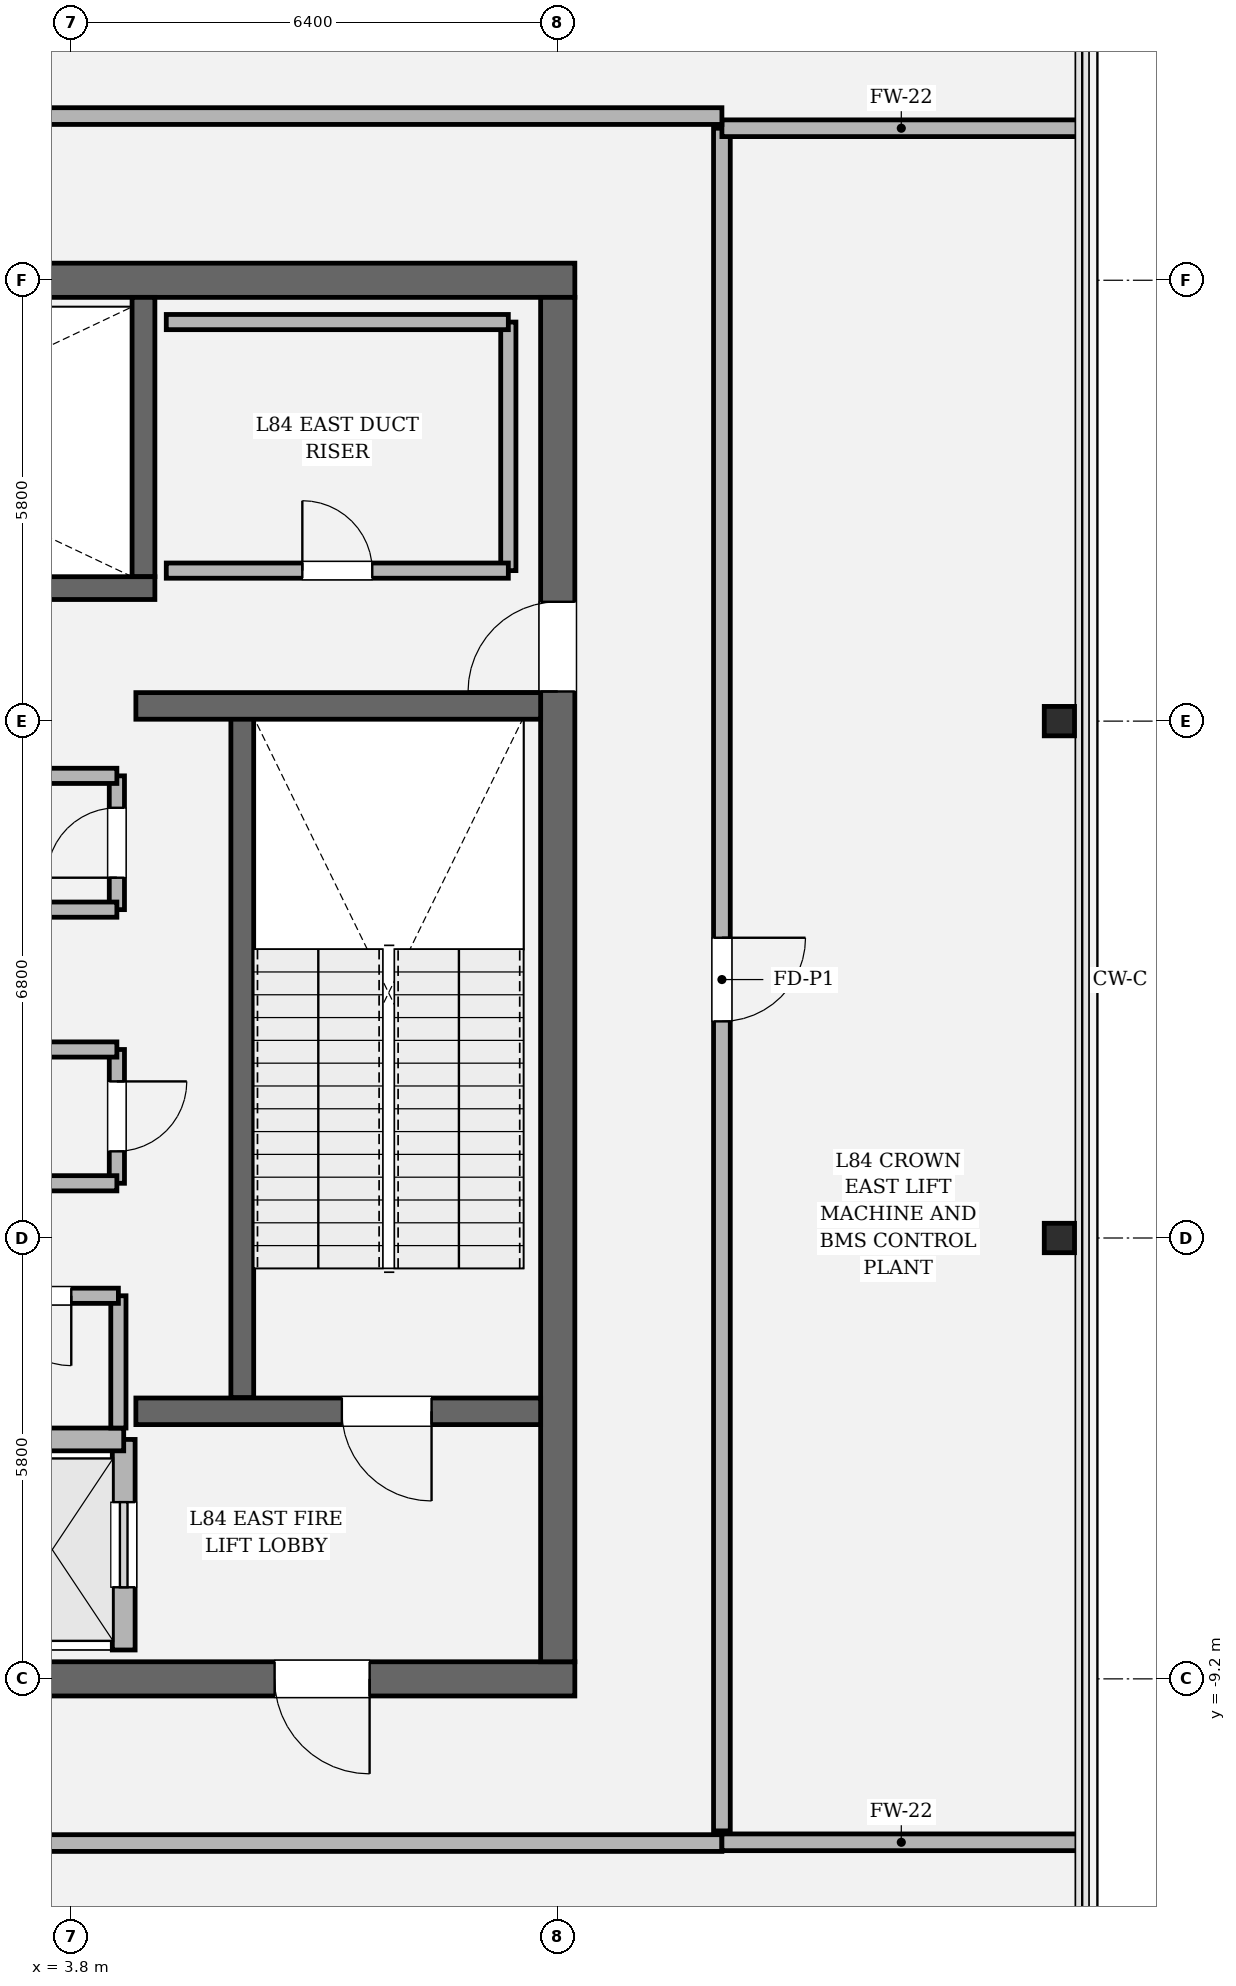
"""IFC4 building model, lengths in metres.
Left out: names, types, materials, properties, quantities, classifications, styles, units other than length and angle.
Written with IfcOpenShell. Run it as: python <this file> out.ifc"""

import sys

from ifc_helpers import new_model, si_unit, direction, frame, frame_2d, origin, origin_2d, place, context, subcontext, project, spatial, rectangle, i_section, extrude, element, fill, save


model = new_model("IFC4")
c1 = context("Model", 3, precision=1e-05, world=origin(), true_north=direction((0.0, 1.0)))
c2 = subcontext(c1, "Body", "Model", "MODEL_VIEW")
j1 = project(units=[si_unit("LENGTHUNIT", "METRE"), si_unit("PLANEANGLEUNIT", "RADIAN")], contexts=[c1])
p1 = place(None, origin())
s1 = spatial("IfcSite", under=j1, at=p1, CompositionType="ELEMENT")
p2 = place(p1, origin())
s2 = spatial("IfcBuilding", under=s1, at=p2, CompositionType="ELEMENT")
p3 = place(p2, frame((0.0, 0.0, 357.3)))
s3 = spatial("IfcBuildingStorey", under=s2, at=p3, CompositionType="ELEMENT", Elevation=357.3)
p4 = place(p3, frame((10.425, -9.2, 0.0), z_axis=(0.0, 0.0, 1.0), x_axis=(-1.0, 0.0, 0.0)))
e1 = element("IfcWall", 1, at=p4, inside=s3, PredefinedType="SHEAR", context=c2, shape_type="SweptSolid", body=[
    extrude(rectangle(XDim=20.85, YDim=0.45, at=frame_2d((10.425, 0.0))), origin(), (0.0, 0.0, 1.0), 4.5),
])
p5 = place(p4, frame((2.7, 0.0, 0.0)))
e2 = element("IfcOpeningElement", 2, at=p5, cuts=e1, PredefinedType="OPENING", context=c2, shape_type="SweptSolid", body=[
    extrude(rectangle(XDim=1.25, YDim=2.25, at=frame_2d((0.625, 1.125))), frame((0.0, 0.235, 0.0), z_axis=(0.0, -1.0, 0.0), x_axis=(1.0, 0.0, 0.0)), (0.0, 0.0, 1.0), 0.47),
])
p6 = place(p4, frame((16.9, 0.0, 0.0)))
e3 = element("IfcOpeningElement", 3, at=p6, cuts=e1, PredefinedType="OPENING", context=c2, shape_type="SweptSolid", body=[
    extrude(rectangle(XDim=1.25, YDim=2.25, at=frame_2d((0.625, 1.125))), frame((0.0, 0.235, 0.0), z_axis=(0.0, -1.0, 0.0), x_axis=(1.0, 0.0, 0.0)), (0.0, 0.0, 1.0), 0.47),
])
p7 = place(p3, frame((-10.425, 9.2, 0.0), z_axis=(0.0, 0.0, 1.0), x_axis=(1.0, 0.0, 0.0)))
e4 = element("IfcWall", 4, at=p7, inside=s3, PredefinedType="SHEAR", context=c2, shape_type="SweptSolid", body=[
    extrude(rectangle(XDim=20.85, YDim=0.45, at=frame_2d((10.425, 0.0))), origin(), (0.0, 0.0, 1.0), 4.5),
])
p8 = place(p3, frame((10.2, 8.975, 0.0), z_axis=(0.0, 0.0, 1.0), x_axis=(0.0, -1.0, 0.0)))
e5 = element("IfcWall", 5, at=p8, inside=s3, PredefinedType="SHEAR", context=c2, shape_type="SweptSolid", body=[
    extrude(rectangle(XDim=17.95, YDim=0.45, at=frame_2d((8.975, 0.0))), origin(), (0.0, 0.0, 1.0), 4.5),
])
p9 = place(p8, frame((4.005, 0.0, 0.0)))
e6 = element("IfcOpeningElement", 6, at=p9, cuts=e5, PredefinedType="OPENING", context=c2, shape_type="SweptSolid", body=[
    extrude(rectangle(XDim=1.18, YDim=2.2, at=frame_2d((0.59, 1.1))), frame((0.0, 0.235, 0.0), z_axis=(0.0, -1.0, 0.0), x_axis=(1.0, 0.0, 0.0)), (0.0, 0.0, 1.0), 0.47),
])
p10 = place(p3, frame((6.05, 3.45, 0.0), z_axis=(0.0, 0.0, 1.0), x_axis=(0.0, -1.0, 0.0)))
e7 = element("IfcWall", 7, at=p10, inside=s3, PredefinedType="SOLIDWALL", context=c2, shape_type="SweptSolid", body=[
    extrude(rectangle(XDim=8.95, YDim=0.3, at=frame_2d((4.475, 0.0))), origin(), (0.0, 0.0, 1.0), 4.5),
])
p11 = place(p3, frame((4.75, 8.975, 0.0), z_axis=(0.0, 0.0, 1.0), x_axis=(0.0, -1.0, 0.0)))
e8 = element("IfcWall", 8, at=p11, inside=s3, PredefinedType="SOLIDWALL", context=c2, shape_type="SweptSolid", body=[
    extrude(rectangle(XDim=3.675, YDim=0.3, at=frame_2d((1.837, 0.0))), origin(), (0.0, 0.0, 1.0), 4.5),
])
p12 = place(p3, frame((-4.9, 5.15, 0.0), z_axis=(0.0, 0.0, 1.0), x_axis=(1.0, 0.0, 0.0)))
e9 = element("IfcWall", 9, at=p12, inside=s3, PredefinedType="SOLIDWALL", context=c2, shape_type="SweptSolid", body=[
    extrude(rectangle(XDim=9.8, YDim=0.3, at=frame_2d((4.9, 0.0))), origin(), (0.0, 0.0, 1.0), 4.5),
])
p13 = place(p12, frame((0.56, 0.0, 0.0)))
e10 = element("IfcOpeningElement", 10, at=p13, cuts=e9, PredefinedType="OPENING", context=c2, shape_type="SweptSolid", body=[
    extrude(rectangle(XDim=1.18, YDim=2.2, at=frame_2d((0.59, 1.1))), frame((0.0, 0.16, 0.0), z_axis=(0.0, -1.0, 0.0), x_axis=(1.0, 0.0, 0.0)), (0.0, 0.0, 1.0), 0.32),
])
p14 = place(p3, frame((4.65, -5.68, 0.0), z_axis=(0.0, 0.0, 1.0), x_axis=(1.0, 0.0, 0.0)))
e11 = element("IfcWall", 11, at=p14, inside=s3, PredefinedType="SOLIDWALL", context=c2, shape_type="SweptSolid", body=[
    extrude(rectangle(XDim=5.325, YDim=0.35, at=frame_2d((2.663, 0.0))), origin(), (0.0, 0.0, 1.0), 4.5),
])
p15 = place(p14, frame((2.71, 0.0, 0.0)))
e12 = element("IfcOpeningElement", 12, at=p15, cuts=e11, PredefinedType="OPENING", context=c2, shape_type="SweptSolid", body=[
    extrude(rectangle(XDim=1.18, YDim=2.2, at=frame_2d((0.59, 1.1))), frame((0.0, 0.185, 0.0), z_axis=(0.0, -1.0, 0.0), x_axis=(1.0, 0.0, 0.0)), (0.0, 0.0, 1.0), 0.37),
])
p16 = place(p3, frame((4.65, 3.6, 0.0), z_axis=(0.0, 0.0, 1.0), x_axis=(1.0, 0.0, 0.0)))
e13 = element("IfcWall", 13, at=p16, inside=s3, PredefinedType="SOLIDWALL", context=c2, shape_type="SweptSolid", body=[
    extrude(rectangle(XDim=5.325, YDim=0.35, at=frame_2d((2.663, 0.0))), origin(), (0.0, 0.0, 1.0), 4.5),
])
for number, where, z_axis, x_axis in (
    (14, (16.8, -3.4, 0.0), (0.0, 0.0, 1.0), (1.0, 0.0, 0.0)),
    (15, (16.8, 3.4, 0.0), (0.0, 0.0, 1.0), (1.0, 0.0, 0.0)),
):
    element("IfcColumn", number, at=place(p3, frame(where, z_axis=z_axis, x_axis=x_axis)), inside=s3, PredefinedType="COLUMN", context=c2, shape_type="SweptSolid", body=[
        extrude(i_section(OverallWidth=0.398, OverallDepth=0.387, WebThickness=0.021, FlangeThickness=0.033, FilletRadius=0.018, at=origin_2d()), origin(), (0.0, 0.0, 1.0), 4.498),
    ])
p17 = place(p3, frame((4.49, -8.82, 0.0), z_axis=(0.0, 0.0, 1.0), x_axis=(0.0, 1.0, 0.0)))
e16 = element("IfcWall", 16, at=p17, inside=s3, PredefinedType="SOLIDWALL", context=c2, shape_type="SweptSolid", body=[
    extrude(rectangle(XDim=2.77, YDim=0.3, at=frame_2d((1.385, 0.0))), origin(), (0.0, 0.0, 1.0), 4.22),
])
p18 = place(p17, frame((0.825, 0.0, 0.0)))
e17 = element("IfcOpeningElement", 17, at=p18, cuts=e16, PredefinedType="OPENING", context=c2, shape_type="SweptSolid", body=[
    extrude(rectangle(XDim=1.12, YDim=2.25, at=frame_2d((0.56, 1.125))), frame((0.0, 0.16, 0.0), z_axis=(0.0, -1.0, 0.0), x_axis=(1.0, 0.0, 0.0)), (0.0, 0.0, 1.0), 0.32),
])
p19 = place(p3, frame((2.61, -6.05, 0.0), z_axis=(0.0, 0.0, 1.0), x_axis=(1.0, 0.0, 0.0)))
e18 = element("IfcWall", 18, at=p19, inside=s3, PredefinedType="SOLIDWALL", context=c2, shape_type="SweptSolid", body=[
    extrude(rectangle(XDim=1.88, YDim=0.3, at=frame_2d((0.94, 0.0))), origin(), (0.0, 0.0, 1.0), 4.22),
])
p20 = place(p3, frame((4.42, -5.9, 0.0), z_axis=(0.0, 0.0, 1.0), x_axis=(0.0, 1.0, 0.0)))
e19 = element("IfcWall", 19, at=p20, inside=s3, PredefinedType="SOLIDWALL", context=c2, shape_type="SweptSolid", body=[
    extrude(rectangle(XDim=1.74, YDim=0.2, at=frame_2d((0.87, 0.0))), origin(), (0.0, 0.0, 1.0), 4.22),
])
p21 = place(p3, frame((4.42, -4.16, 0.0), z_axis=(0.0, 0.0, 1.0), x_axis=(-1.0, 0.0, 0.0)))
e20 = element("IfcWall", 20, at=p21, inside=s3, PredefinedType="SOLIDWALL", context=c2, shape_type="SweptSolid", body=[
    extrude(rectangle(XDim=2.16, YDim=0.2, at=frame_2d((1.08, 0.0))), origin(), (0.0, 0.0, 1.0), 4.22),
])
p22 = place(p21, frame((0.62, 0.0, 0.0)))
e21 = element("IfcOpeningElement", 21, at=p22, cuts=e20, PredefinedType="OPENING", context=c2, shape_type="SweptSolid", body=[
    extrude(rectangle(XDim=0.92, YDim=2.1, at=frame_2d((0.46, 1.05))), frame((0.0, 0.11, 0.0), z_axis=(0.0, -1.0, 0.0), x_axis=(1.0, 0.0, 0.0)), (0.0, 0.0, 1.0), 0.22),
])
p23 = place(p3, frame((4.4, -2.68, 0.0), z_axis=(0.0, 0.0, 1.0), x_axis=(0.0, 1.0, 0.0)))
e22 = element("IfcWall", 22, at=p23, inside=s3, PredefinedType="SOLIDWALL", context=c2, shape_type="SweptSolid", body=[
    extrude(rectangle(XDim=1.76, YDim=0.2, at=frame_2d((0.88, 0.0))), origin(), (0.0, 0.0, 1.0), 4.22),
])
p24 = place(p23, frame((0.42, 0.0, 0.0)))
e23 = element("IfcOpeningElement", 23, at=p24, cuts=e22, PredefinedType="OPENING", context=c2, shape_type="SweptSolid", body=[
    extrude(rectangle(XDim=0.92, YDim=2.1, at=frame_2d((0.46, 1.05))), frame((0.0, 0.11, 0.0), z_axis=(0.0, -1.0, 0.0), x_axis=(1.0, 0.0, 0.0)), (0.0, 0.0, 1.0), 0.22),
])
for number, where, z_axis, x_axis in (
    (24, (4.4, -0.92, 0.0), (0.0, 0.0, 1.0), (-1.0, 0.0, 0.0)),
    (25, (-4.4, -2.68, 0.0), (0.0, 0.0, 1.0), (1.0, 0.0, 0.0)),
):
    element("IfcWall", number, at=place(p3, frame(where, z_axis=z_axis, x_axis=x_axis)), inside=s3, PredefinedType="SOLIDWALL", context=c2, shape_type="SweptSolid", body=[
        extrude(rectangle(XDim=8.8, YDim=0.2, at=frame_2d((4.4, 0.0))), origin(), (0.0, 0.0, 1.0), 4.22),
    ])
p25 = place(p3, frame((4.4, 0.92, 0.0), z_axis=(0.0, 0.0, 1.0), x_axis=(0.0, 1.0, 0.0)))
e26 = element("IfcWall", 26, at=p25, inside=s3, PredefinedType="SOLIDWALL", context=c2, shape_type="SweptSolid", body=[
    extrude(rectangle(XDim=1.76, YDim=0.2, at=frame_2d((0.88, 0.0))), origin(), (0.0, 0.0, 1.0), 4.22),
])
p26 = place(p25, frame((0.42, 0.0, 0.0)))
e27 = element("IfcOpeningElement", 27, at=p26, cuts=e26, PredefinedType="OPENING", context=c2, shape_type="SweptSolid", body=[
    extrude(rectangle(XDim=0.92, YDim=2.1, at=frame_2d((0.46, 1.05))), frame((0.0, 0.11, 0.0), z_axis=(0.0, -1.0, 0.0), x_axis=(1.0, 0.0, 0.0)), (0.0, 0.0, 1.0), 0.22),
])
for number, where, z_axis, x_axis in (
    (28, (4.4, 2.68, 0.0), (0.0, 0.0, 1.0), (-1.0, 0.0, 0.0)),
    (29, (-4.4, 0.92, 0.0), (0.0, 0.0, 1.0), (1.0, 0.0, 0.0)),
):
    element("IfcWall", number, at=place(p3, frame(where, z_axis=z_axis, x_axis=x_axis)), inside=s3, PredefinedType="SOLIDWALL", context=c2, shape_type="SweptSolid", body=[
        extrude(rectangle(XDim=8.8, YDim=0.2, at=frame_2d((4.4, 0.0))), origin(), (0.0, 0.0, 1.0), 4.22),
    ])
p27 = place(p3, frame((9.55, 5.38, 0.0), z_axis=(0.0, 0.0, 1.0), x_axis=(0.0, 1.0, 0.0)))
e30 = element("IfcWall", 30, at=p27, inside=s3, PredefinedType="SOLIDWALL", context=c2, shape_type="SweptSolid", body=[
    extrude(rectangle(XDim=3.27, YDim=0.2, at=frame_2d((1.635, 0.0))), origin(), (0.0, 0.0, 1.0), 4.22),
])
p28 = place(p3, frame((9.55, 8.65, 0.0), z_axis=(0.0, 0.0, 1.0), x_axis=(-1.0, 0.0, 0.0)))
e31 = element("IfcWall", 31, at=p28, inside=s3, PredefinedType="SOLIDWALL", context=c2, shape_type="SweptSolid", body=[
    extrude(rectangle(XDim=4.5, YDim=0.2, at=frame_2d((2.25, 0.0))), origin(), (0.0, 0.0, 1.0), 4.22),
])
p29 = place(p3, frame((5.05, 5.38, 0.0), z_axis=(0.0, 0.0, 1.0), x_axis=(1.0, 0.0, 0.0)))
e32 = element("IfcWall", 32, at=p29, inside=s3, PredefinedType="SOLIDWALL", context=c2, shape_type="SweptSolid", body=[
    extrude(rectangle(XDim=4.5, YDim=0.2, at=frame_2d((2.25, 0.0))), origin(), (0.0, 0.0, 1.0), 4.22),
])
p30 = place(p29, frame((1.79, 0.0, 0.0)))
e33 = element("IfcOpeningElement", 33, at=p30, cuts=e32, PredefinedType="OPENING", context=c2, shape_type="SweptSolid", body=[
    extrude(rectangle(XDim=0.92, YDim=2.1, at=frame_2d((0.46, 1.05))), frame((0.0, 0.11, 0.0), z_axis=(0.0, -1.0, 0.0), x_axis=(1.0, 0.0, 0.0)), (0.0, 0.0, 1.0), 0.22),
])
p31 = place(p3, frame((-12.36, -11.36, 0.0), z_axis=(0.0, 0.0, 1.0), x_axis=(1.0, 0.0, 0.0)))
e34 = element("IfcWall", 34, at=p31, inside=s3, PredefinedType="SOLIDWALL", context=c2, shape_type="SweptSolid", body=[
    extrude(rectangle(XDim=24.72, YDim=0.22, at=frame_2d((12.36, 0.0))), origin(), (0.0, 0.0, 1.0), 2.934),
])
p32 = place(p31, frame((11.81, 0.0, 0.0)))
e35 = element("IfcOpeningElement", 35, at=p32, cuts=e34, PredefinedType="OPENING", context=c2, shape_type="SweptSolid", body=[
    extrude(rectangle(XDim=1.1, YDim=2.2, at=frame_2d((0.55, 1.1))), frame((0.0, 0.12, 0.0), z_axis=(0.0, -1.0, 0.0), x_axis=(1.0, 0.0, 0.0)), (0.0, 0.0, 1.0), 0.24),
])
p33 = place(p3, frame((12.36, -11.35, 0.0), z_axis=(0.0, 0.0, 1.0), x_axis=(1.0, 0.0, 0.0)))
e36 = element("IfcWall", 36, at=p33, inside=s3, PredefinedType="SOLIDWALL", context=c2, shape_type="SweptSolid", body=[
    extrude(rectangle(XDim=4.72, YDim=0.22, at=frame_2d((2.36, 0.0))), origin(), (0.0, 0.0, 1.0), 2.934),
])
p34 = place(p3, frame((12.36, -11.2, 0.0), z_axis=(0.0, 0.0, 1.0), x_axis=(0.0, 1.0, 0.0)))
e37 = element("IfcWall", 37, at=p34, inside=s3, PredefinedType="SOLIDWALL", context=c2, shape_type="SweptSolid", body=[
    extrude(rectangle(XDim=22.4, YDim=0.22, at=frame_2d((11.2, 0.0))), origin(), (0.0, 0.0, 1.0), 2.934),
])
p35 = place(p34, frame((10.65, 0.0, 0.0)))
e38 = element("IfcOpeningElement", 38, at=p35, cuts=e37, PredefinedType="OPENING", context=c2, shape_type="SweptSolid", body=[
    extrude(rectangle(XDim=1.1, YDim=2.2, at=frame_2d((0.55, 1.1))), frame((0.0, 0.12, 0.0), z_axis=(0.0, -1.0, 0.0), x_axis=(1.0, 0.0, 0.0)), (0.0, 0.0, 1.0), 0.24),
])
p36 = place(p3, frame((12.36, 11.2, 0.0), z_axis=(0.0, 0.0, 1.0), x_axis=(1.0, 0.0, 0.0)))
e39 = element("IfcWall", 39, at=p36, inside=s3, PredefinedType="SOLIDWALL", context=c2, shape_type="SweptSolid", body=[
    extrude(rectangle(XDim=4.72, YDim=0.22, at=frame_2d((2.36, 0.0))), origin(), (0.0, 0.0, 1.0), 2.934),
])
p37 = place(p3, frame((12.36, 11.36, 0.0), z_axis=(0.0, 0.0, 1.0), x_axis=(-1.0, 0.0, 0.0)))
e40 = element("IfcWall", 40, at=p37, inside=s3, PredefinedType="SOLIDWALL", context=c2, shape_type="SweptSolid", body=[
    extrude(rectangle(XDim=24.72, YDim=0.22, at=frame_2d((12.36, 0.0))), origin(), (0.0, 0.0, 1.0), 2.934),
])
p38 = place(p37, frame((11.81, 0.0, 0.0)))
e41 = element("IfcOpeningElement", 41, at=p38, cuts=e40, PredefinedType="OPENING", context=c2, shape_type="SweptSolid", body=[
    extrude(rectangle(XDim=1.1, YDim=2.2, at=frame_2d((0.55, 1.1))), frame((0.0, 0.12, 0.0), z_axis=(0.0, -1.0, 0.0), x_axis=(1.0, 0.0, 0.0)), (0.0, 0.0, 1.0), 0.24),
])
p39 = place(p15, origin())
e42 = element("IfcDoor", 42, at=p39, inside=s3, OperationType="SINGLE_SWING_RIGHT", PredefinedType="DOOR", context=c2, shape_type="SweptSolid", body=[
    extrude(rectangle(XDim=1.18, YDim=2.2, at=frame_2d((0.59, 1.1))), frame((0.0, 0.025, 0.0), z_axis=(0.0, -1.0, 0.0), x_axis=(1.0, 0.0, 0.0)), (0.0, 0.0, 1.0), 0.05),
])
fill(e12, e42)
p40 = place(p5, origin())
e43 = element("IfcDoor", 43, at=p40, inside=s3, OperationType="SINGLE_SWING_LEFT", PredefinedType="DOOR", context=c2, shape_type="SweptSolid", body=[
    extrude(rectangle(XDim=1.25, YDim=2.25, at=frame_2d((0.625, 1.125))), frame((0.0, 0.025, 0.0), z_axis=(0.0, -1.0, 0.0), x_axis=(1.0, 0.0, 0.0)), (0.0, 0.0, 1.0), 0.05),
])
fill(e2, e43)
p41 = place(p9, origin())
e44 = element("IfcDoor", 44, at=p41, inside=s3, OperationType="SINGLE_SWING_RIGHT", PredefinedType="DOOR", context=c2, shape_type="SweptSolid", body=[
    extrude(rectangle(XDim=1.18, YDim=2.2, at=frame_2d((0.59, 1.1))), frame((0.0, 0.025, 0.0), z_axis=(0.0, -1.0, 0.0), x_axis=(1.0, 0.0, 0.0)), (0.0, 0.0, 1.0), 0.05),
])
fill(e6, e44)
p42 = place(p18, origin())
e45 = element("IfcDoor", 45, at=p42, inside=s3, OperationType="SLIDING_TO_RIGHT", PredefinedType="DOOR", context=c2, shape_type="SweptSolid", body=[
    extrude(rectangle(XDim=1.12, YDim=2.25, at=frame_2d((0.56, 1.125))), frame((0.0, 0.025, 0.0), z_axis=(0.0, -1.0, 0.0), x_axis=(1.0, 0.0, 0.0)), (0.0, 0.0, 1.0), 0.05),
])
fill(e17, e45)
p43 = place(p22, origin())
e46 = element("IfcDoor", 46, at=p43, inside=s3, OperationType="SINGLE_SWING_LEFT", PredefinedType="DOOR", context=c2, shape_type="SweptSolid", body=[
    extrude(rectangle(XDim=0.92, YDim=2.1, at=frame_2d((0.46, 1.05))), frame((0.0, 0.025, 0.0), z_axis=(0.0, -1.0, 0.0), x_axis=(1.0, 0.0, 0.0)), (0.0, 0.0, 1.0), 0.05),
])
fill(e21, e46)
p44 = place(p24, origin())
e47 = element("IfcDoor", 47, at=p44, inside=s3, OperationType="SINGLE_SWING_RIGHT", PredefinedType="DOOR", context=c2, shape_type="SweptSolid", body=[
    extrude(rectangle(XDim=0.92, YDim=2.1, at=frame_2d((0.46, 1.05))), frame((0.0, 0.025, 0.0), z_axis=(0.0, -1.0, 0.0), x_axis=(1.0, 0.0, 0.0)), (0.0, 0.0, 1.0), 0.05),
])
fill(e23, e47)
p45 = place(p26, origin())
e48 = element("IfcDoor", 48, at=p45, inside=s3, OperationType="SINGLE_SWING_LEFT", PredefinedType="DOOR", context=c2, shape_type="SweptSolid", body=[
    extrude(rectangle(XDim=0.92, YDim=2.1, at=frame_2d((0.46, 1.05))), frame((0.0, 0.025, 0.0), z_axis=(0.0, -1.0, 0.0), x_axis=(1.0, 0.0, 0.0)), (0.0, 0.0, 1.0), 0.05),
])
fill(e27, e48)
p46 = place(p30, origin())
e49 = element("IfcDoor", 49, at=p46, inside=s3, OperationType="SINGLE_SWING_LEFT", PredefinedType="DOOR", context=c2, shape_type="SweptSolid", body=[
    extrude(rectangle(XDim=0.92, YDim=2.1, at=frame_2d((0.46, 1.05))), frame((0.0, 0.025, 0.0), z_axis=(0.0, -1.0, 0.0), x_axis=(1.0, 0.0, 0.0)), (0.0, 0.0, 1.0), 0.05),
])
fill(e33, e49)
p47 = place(p35, origin())
e50 = element("IfcDoor", 50, at=p47, inside=s3, OperationType="SINGLE_SWING_RIGHT", PredefinedType="DOOR", context=c2, shape_type="SweptSolid", body=[
    extrude(rectangle(XDim=1.1, YDim=2.2, at=frame_2d((0.55, 1.1))), frame((0.0, 0.025, 0.0), z_axis=(0.0, -1.0, 0.0), x_axis=(1.0, 0.0, 0.0)), (0.0, 0.0, 1.0), 0.05),
])
fill(e38, e50)
save(model, sys.argv[1])
